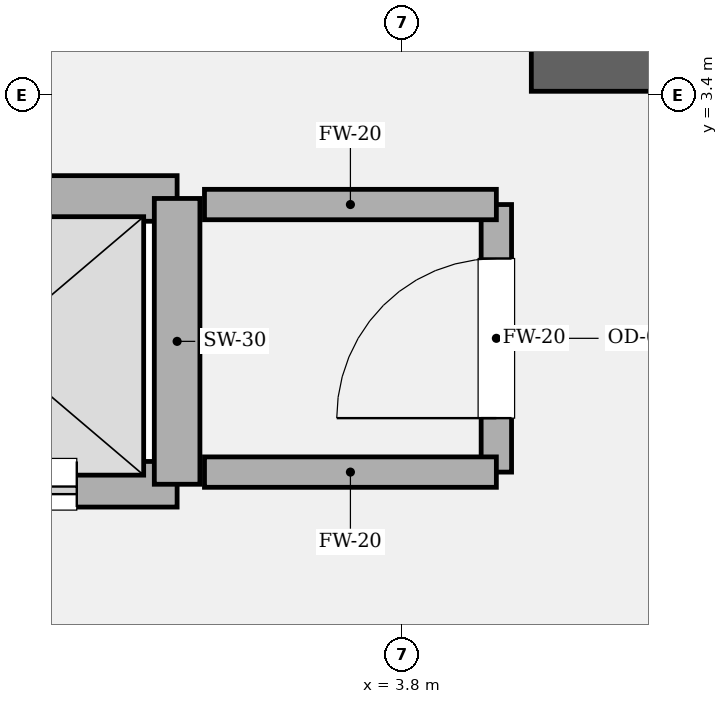
"""IFC4 building model, lengths in metres.
Left out: names, types, materials, properties, quantities, classifications, styles, units other than length and angle.
Written with IfcOpenShell. Run it as: python <this file> out.ifc"""

import sys

from ifc_helpers import new_model, si_unit, direction, frame, frame_2d, origin, place, context, subcontext, project, spatial, rectangle, extrude, element, fill, save


model = new_model("IFC4")
c1 = context("Model", 3, precision=1e-05, world=origin(), true_north=direction((0.0, 1.0)))
c2 = subcontext(c1, "Body", "Model", "MODEL_VIEW")
j1 = project(units=[si_unit("LENGTHUNIT", "METRE"), si_unit("PLANEANGLEUNIT", "RADIAN")], contexts=[c1])
p1 = place(None, origin())
s1 = spatial("IfcSite", under=j1, at=p1, CompositionType="ELEMENT")
p2 = place(p1, origin())
s2 = spatial("IfcBuilding", under=s1, at=p2, CompositionType="ELEMENT")
p3 = place(p2, frame((0.0, 0.0, 330.0)))
s3 = spatial("IfcBuildingStorey", under=s2, at=p3, CompositionType="ELEMENT", Elevation=330.0)
p4 = place(p3, frame((4.65, 3.6, 0.0), z_axis=(0.0, 0.0, 1.0), x_axis=(1.0, 0.0, 0.0)))
e1 = element("IfcWall", 1, at=p4, inside=s3, PredefinedType="SOLIDWALL", context=c2, shape_type="SweptSolid", body=[
    extrude(rectangle(XDim=5.325, YDim=0.35, at=frame_2d((2.663, 0.0))), origin(), (0.0, 0.0, 1.0), 4.2),
])
p5 = place(p3, frame((-2.32, 0.84, 0.0), z_axis=(0.0, 0.0, 1.0), x_axis=(1.0, 0.0, 0.0)))
e2 = element("IfcWall", 2, at=p5, inside=s3, PredefinedType="SOLIDWALL", context=c2, shape_type="SweptSolid", body=[
    extrude(rectangle(XDim=4.64, YDim=0.3, at=frame_2d((2.32, 0.0))), origin(), (0.0, 0.0, 1.0), 3.94),
])
p6 = place(p5, frame((0.66, 0.0, 0.0)))
e3 = element("IfcOpeningElement", 3, at=p6, cuts=e2, PredefinedType="OPENING", context=c2, shape_type="SweptSolid", body=[
    extrude(rectangle(XDim=1.12, YDim=2.25, at=frame_2d((0.56, 1.125))), frame((0.0, 0.16, 0.0), z_axis=(0.0, -1.0, 0.0), x_axis=(1.0, 0.0, 0.0)), (0.0, 0.0, 1.0), 0.32),
])
p7 = place(p5, frame((2.86, 0.0, 0.0)))
e4 = element("IfcOpeningElement", 4, at=p7, cuts=e2, PredefinedType="OPENING", context=c2, shape_type="SweptSolid", body=[
    extrude(rectangle(XDim=1.12, YDim=2.25, at=frame_2d((0.56, 1.125))), frame((0.0, 0.16, 0.0), z_axis=(0.0, -1.0, 0.0), x_axis=(1.0, 0.0, 0.0)), (0.0, 0.0, 1.0), 0.32),
])
p8 = place(p3, frame((-2.32, 2.72, 0.0), z_axis=(0.0, 0.0, 1.0), x_axis=(1.0, 0.0, 0.0)))
e5 = element("IfcWall", 5, at=p8, inside=s3, PredefinedType="SOLIDWALL", context=c2, shape_type="SweptSolid", body=[
    extrude(rectangle(XDim=4.64, YDim=0.3, at=frame_2d((2.32, 0.0))), origin(), (0.0, 0.0, 1.0), 3.94),
])
p9 = place(p3, frame((2.32, 0.84, 0.0), z_axis=(0.0, 0.0, 1.0), x_axis=(0.0, 1.0, 0.0)))
e6 = element("IfcWall", 6, at=p9, inside=s3, PredefinedType="SOLIDWALL", context=c2, shape_type="SweptSolid", body=[
    extrude(rectangle(XDim=1.88, YDim=0.3, at=frame_2d((0.94, 0.0))), origin(), (0.0, 0.0, 1.0), 3.94),
])
p10 = place(p3, frame((4.42, 0.92, 0.0), z_axis=(0.0, 0.0, 1.0), x_axis=(0.0, 1.0, 0.0)))
e7 = element("IfcWall", 7, at=p10, inside=s3, PredefinedType="SOLIDWALL", context=c2, shape_type="SweptSolid", body=[
    extrude(rectangle(XDim=1.76, YDim=0.2, at=frame_2d((0.88, 0.0))), origin(), (0.0, 0.0, 1.0), 3.94),
])
p11 = place(p10, frame((0.355, 0.0, 0.0)))
e8 = element("IfcOpeningElement", 8, at=p11, cuts=e7, PredefinedType="OPENING", context=c2, shape_type="SweptSolid", body=[
    extrude(rectangle(XDim=1.05, YDim=2.2, at=frame_2d((0.525, 1.1))), frame((0.0, 0.11, 0.0), z_axis=(0.0, -1.0, 0.0), x_axis=(1.0, 0.0, 0.0)), (0.0, 0.0, 1.0), 0.22),
])
for number, where, z_axis, x_axis in (
    (9, (4.42, 2.68, 0.0), (0.0, 0.0, 1.0), (-1.0, 0.0, 0.0)),
    (10, (2.5, 0.92, 0.0), (0.0, 0.0, 1.0), (1.0, 0.0, 0.0)),
):
    element("IfcWall", number, at=place(p3, frame(where, z_axis=z_axis, x_axis=x_axis)), inside=s3, PredefinedType="SOLIDWALL", context=c2, shape_type="SweptSolid", body=[
        extrude(rectangle(XDim=1.92, YDim=0.2, at=frame_2d((0.96, 0.0))), origin(), (0.0, 0.0, 1.0), 3.94),
    ])
p12 = place(p7, origin())
e11 = element("IfcDoor", 11, at=p12, inside=s3, OperationType="DOUBLE_DOOR_SLIDING", PredefinedType="DOOR", context=c2, shape_type="SweptSolid", body=[
    extrude(rectangle(XDim=1.12, YDim=2.25, at=frame_2d((0.56, 1.125))), frame((0.0, 0.025, 0.0), z_axis=(0.0, -1.0, 0.0), x_axis=(1.0, 0.0, 0.0)), (0.0, 0.0, 1.0), 0.05),
])
fill(e4, e11)
p13 = place(p11, origin())
e12 = element("IfcDoor", 12, at=p13, inside=s3, OperationType="SINGLE_SWING_LEFT", PredefinedType="DOOR", context=c2, shape_type="SweptSolid", body=[
    extrude(rectangle(XDim=1.05, YDim=2.2, at=frame_2d((0.525, 1.1))), frame((0.0, 0.025, 0.0), z_axis=(0.0, -1.0, 0.0), x_axis=(1.0, 0.0, 0.0)), (0.0, 0.0, 1.0), 0.05),
])
fill(e8, e12)
save(model, sys.argv[1])
